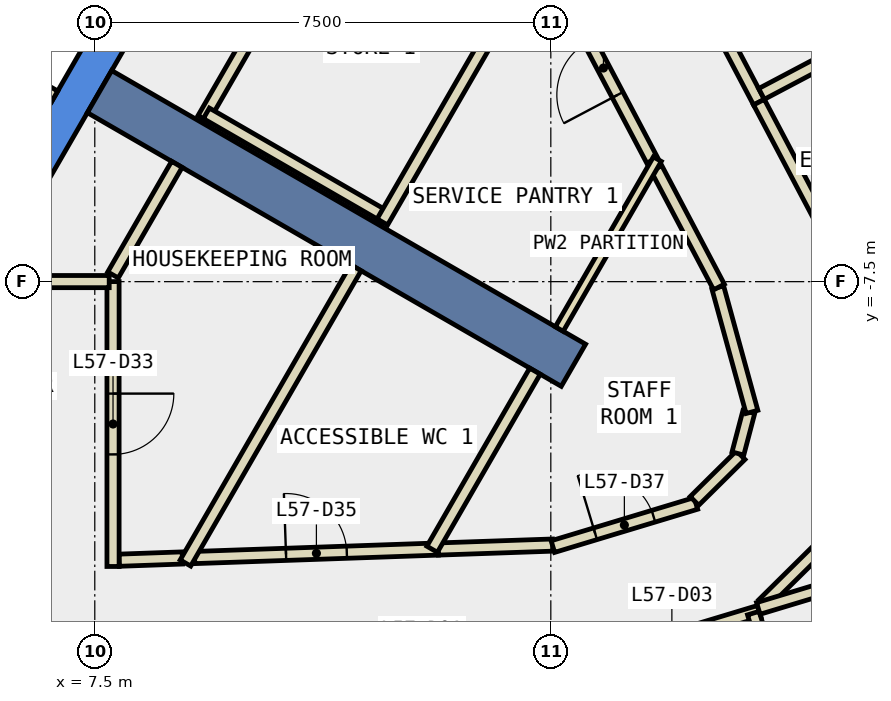
"""IFC4 building model, lengths in metres.
Left out: names, types, materials, properties, quantities, classifications, styles, units other than length and angle.
Written with IfcOpenShell. Run it as: python <this file> out.ifc"""

import sys

from ifc_helpers import new_model, si_unit, direction, frame, frame_2d, origin, place, context, subcontext, project, spatial, polyline, rectangle, outline, extrude, element, fill, save


model = new_model("IFC4")
c1 = context("Model", 3, precision=1e-05, world=origin(), true_north=direction((0.0, 1.0)))
c2 = subcontext(c1, "Body", "Model", "MODEL_VIEW")
j1 = project(units=[si_unit("LENGTHUNIT", "METRE"), si_unit("PLANEANGLEUNIT", "RADIAN")], contexts=[c1])
p1 = place(None, origin())
s1 = spatial("IfcSite", under=j1, at=p1, CompositionType="ELEMENT")
p2 = place(p1, origin())
s2 = spatial("IfcBuilding", under=s1, at=p2, CompositionType="ELEMENT")
p3 = place(p2, frame((0.0, 0.0, 252.2)))
s3 = spatial("IfcBuildingStorey", under=s2, at=p3, CompositionType="ELEMENT", Elevation=252.2)
p4 = place(p3, frame((0.0, 0.0, -0.34)))
e1 = element("IfcWall", 1, at=p4, inside=s3, PredefinedType="SHEAR", context=c2, shape_type="SweptSolid", body=[
    extrude(outline(polyline([(5.774, -7.5), (11.547, 2.5), (10.854, 2.5), (5.427, -6.9), (5.774, -7.5)])), origin(), (0.0, 0.0, 1.0), 3.6),
])
p5 = place(p3, frame((7.578, -4.375, -0.34), z_axis=(0.0, 0.0, 1.0), x_axis=(0.866024315419, -0.5000018851, 0.0)))
e2 = element("IfcWall", 2, at=p5, inside=s3, PredefinedType="SHEAR", context=c2, shape_type="SweptSolid", body=[
    extrude(rectangle(XDim=9.0, YDim=0.8, at=frame_2d((4.5, 0.0))), origin(), (0.0, 0.0, 1.0), 3.6),
])
p6 = place(p3, frame((7.9, -12.081, 0.0), z_axis=(0.0, 0.0, 1.0), x_axis=(0.999365240621, 0.035624652105, 0.0)))
e3 = element("IfcWall", 3, at=p6, inside=s3, PredefinedType="PARTITIONING", context=c2, shape_type="SweptSolid", body=[
    extrude(rectangle(XDim=1.042, YDim=0.2, at=frame_2d((0.521, 0.0))), origin(), (0.0, 0.0, 1.0), 3.26),
])
p7 = place(p3, frame((9.141, -12.037, 0.0), z_axis=(0.0, 0.0, 1.0), x_axis=(0.999388955878, 0.034953038062, 0.0)))
e4 = element("IfcWall", 4, at=p7, inside=s3, PredefinedType="PARTITIONING", context=c2, shape_type="SweptSolid", body=[
    extrude(rectangle(XDim=4.009, YDim=0.2, at=frame_2d((2.005, 0.0))), origin(), (0.0, 0.0, 1.0), 3.26),
])
p8 = place(p7, frame((1.505, 0.0, 0.0)))
e5 = element("IfcOpeningElement", 5, at=p8, cuts=e4, PredefinedType="OPENING", context=c2, shape_type="SweptSolid", body=[
    extrude(rectangle(XDim=1.0, YDim=2.1, at=frame_2d((0.5, 1.05))), frame((0.0, 0.11, 0.0), z_axis=(0.0, -1.0, 0.0), x_axis=(1.0, 0.0, 0.0)), (0.0, 0.0, 1.0), 0.22),
])
p9 = place(p3, frame((16.667, -5.505, 0.0), z_axis=(0.0, 0.0, 1.0), x_axis=(-0.466812680399, 0.884356218624, 0.0)))
e6 = element("IfcWall", 6, at=p9, inside=s3, PredefinedType="PARTITIONING", context=c2, shape_type="SweptSolid", body=[
    extrude(rectangle(XDim=3.434, YDim=0.2, at=frame_2d((1.717, 0.0))), origin(), (0.0, 0.0, 1.0), 3.26),
])
p10 = place(p9, frame((1.217, 0.0, 0.0)))
e7 = element("IfcOpeningElement", 7, at=p10, cuts=e6, PredefinedType="OPENING", context=c2, shape_type="SweptSolid", body=[
    extrude(rectangle(XDim=1.0, YDim=2.1, at=frame_2d((0.5, 1.05))), frame((0.0, 0.11, 0.0), z_axis=(0.0, -1.0, 0.0), x_axis=(1.0, 0.0, 0.0)), (0.0, 0.0, 1.0), 0.22),
])
p11 = place(p3, frame((13.148, -11.897, 0.0), z_axis=(0.0, 0.0, 1.0), x_axis=(0.999405229262, 0.034484601243, 0.0)))
e8 = element("IfcWall", 8, at=p11, inside=s3, PredefinedType="PARTITIONING", context=c2, shape_type="SweptSolid", body=[
    extrude(rectangle(XDim=1.883, YDim=0.2, at=frame_2d((0.942, 0.0))), origin(), (0.0, 0.0, 1.0), 3.26),
])
p12 = place(p3, frame((15.034, -11.857, 0.0), z_axis=(0.0, 0.0, 1.0), x_axis=(0.957338084933, 0.288970225346, 0.0)))
e9 = element("IfcWall", 9, at=p12, inside=s3, PredefinedType="PARTITIONING", context=c2, shape_type="SweptSolid", body=[
    extrude(rectangle(XDim=2.457, YDim=0.2, at=frame_2d((1.229, 0.0))), origin(), (0.0, 0.0, 1.0), 3.26),
])
p13 = place(p12, frame((0.728, 0.0, 0.0)))
e10 = element("IfcOpeningElement", 10, at=p13, cuts=e9, PredefinedType="OPENING", context=c2, shape_type="SweptSolid", body=[
    extrude(rectangle(XDim=1.0, YDim=2.1, at=frame_2d((0.5, 1.05))), frame((0.0, 0.11, 0.0), z_axis=(0.0, -1.0, 0.0), x_axis=(1.0, 0.0, 0.0)), (0.0, 0.0, 1.0), 0.22),
])
p14 = place(p3, frame((17.362, -11.106, 0.0), z_axis=(0.0, 0.0, 1.0), x_axis=(0.710859741153, 0.703333795866, 0.0)))
e11 = element("IfcWall", 11, at=p14, inside=s3, PredefinedType="PARTITIONING", context=c2, shape_type="SweptSolid", body=[
    extrude(rectangle(XDim=1.071, YDim=0.2, at=frame_2d((0.535, 0.0))), origin(), (0.0, 0.0, 1.0), 3.26),
])
p15 = place(p3, frame((18.077, -10.326, 0.0), z_axis=(0.0, 0.0, 1.0), x_axis=(0.254782174857, 0.966998471237, 0.0)))
e12 = element("IfcWall", 12, at=p15, inside=s3, PredefinedType="PARTITIONING", context=c2, shape_type="SweptSolid", body=[
    extrude(rectangle(XDim=0.707, YDim=0.2, at=frame_2d((0.354, 0.0))), origin(), (0.0, 0.0, 1.0), 3.26),
])
p16 = place(p3, frame((18.308, -9.642, 0.0), z_axis=(0.0, 0.0, 1.0), x_axis=(-0.264859637197, 0.96428697626, 0.0)))
e13 = element("IfcWall", 13, at=p16, inside=s3, PredefinedType="PARTITIONING", context=c2, shape_type="SweptSolid", body=[
    extrude(rectangle(XDim=2.122, YDim=0.2, at=frame_2d((1.061, 0.0))), origin(), (0.0, 0.0, 1.0), 3.26),
])
p17 = place(p3, frame((17.766, -7.588, 0.0), z_axis=(0.0, 0.0, 1.0), x_axis=(-0.466727344864, 0.884401258228, 0.0)))
e14 = element("IfcWall", 14, at=p17, inside=s3, PredefinedType="PARTITIONING", context=c2, shape_type="SweptSolid", body=[
    extrude(rectangle(XDim=2.205, YDim=0.2, at=frame_2d((1.103, 0.0))), origin(), (0.0, 0.0, 1.0), 3.26),
])
p18 = place(p3, frame((18.427, -12.922, 0.0), z_axis=(0.0, 0.0, 1.0), x_axis=(-0.957336631432, -0.288975040651, 0.0)))
e15 = element("IfcWall", 15, at=p18, inside=s3, PredefinedType="PARTITIONING", context=c2, shape_type="SweptSolid", body=[
    extrude(rectangle(XDim=3.0, YDim=0.2, at=frame_2d((1.5, 0.0))), origin(), (0.0, 0.0, 1.0), 3.26),
])
p19 = place(p18, frame((1.0, 0.0, 0.0)))
e16 = element("IfcOpeningElement", 16, at=p19, cuts=e15, PredefinedType="OPENING", context=c2, shape_type="SweptSolid", body=[
    extrude(rectangle(XDim=1.0, YDim=2.1, at=frame_2d((0.5, 1.05))), frame((0.0, 0.11, 0.0), z_axis=(0.0, -1.0, 0.0), x_axis=(1.0, 0.0, 0.0)), (0.0, 0.0, 1.0), 0.22),
])
p20 = place(p3, frame((19.919, -11.39, 0.0), z_axis=(0.0, 0.0, 1.0), x_axis=(-0.71104667794, -0.70314480855, 0.0)))
e17 = element("IfcWall", 17, at=p20, inside=s3, PredefinedType="PARTITIONING", context=c2, shape_type="SweptSolid", body=[
    extrude(rectangle(XDim=2.008, YDim=0.2, at=frame_2d((1.004, 0.0))), origin(), (0.0, 0.0, 1.0), 3.26),
])
p21 = place(p3, frame((16.778, -1.429, 0.0), z_axis=(0.0, 0.0, 1.0), x_axis=(0.466493865945, -0.884524433261, 0.0)))
e18 = element("IfcWall", 18, at=p21, inside=s3, PredefinedType="PARTITIONING", context=c2, shape_type="SweptSolid", body=[
    extrude(rectangle(XDim=3.526, YDim=0.2, at=frame_2d((1.763, 0.0))), origin(), (0.0, 0.0, 1.0), 3.26),
])
p22 = place(p21, frame((1.313, 0.0, 0.0)))
e19 = element("IfcOpeningElement", 19, at=p22, cuts=e18, PredefinedType="OPENING", context=c2, shape_type="SweptSolid", body=[
    extrude(rectangle(XDim=1.0, YDim=2.1, at=frame_2d((0.5, 1.05))), frame((0.0, 0.11, 0.0), z_axis=(0.0, -1.0, 0.0), x_axis=(1.0, 0.0, 0.0)), (0.0, 0.0, 1.0), 0.22),
])
p23 = place(p3, frame((18.423, -4.548, 0.0), z_axis=(0.0, 0.0, 1.0), x_axis=(0.466792565793, -0.884366835946, 0.0)))
e20 = element("IfcWall", 20, at=p23, inside=s3, PredefinedType="PARTITIONING", context=c2, shape_type="SweptSolid", body=[
    extrude(rectangle(XDim=2.5, YDim=0.2, at=frame_2d((1.25, 0.0))), origin(), (0.0, 0.0, 1.0), 3.26),
])
p24 = place(p3, frame((5.888, -3.902, 0.0), z_axis=(0.0, 0.0, 1.0), x_axis=(0.86621513555, -0.499671230855, 0.0)))
e21 = element("IfcWall", 21, at=p24, inside=s3, PredefinedType="PARTITIONING", context=c2, shape_type="SweptSolid", body=[
    extrude(rectangle(XDim=1.1, YDim=0.2, at=frame_2d((0.55, 0.0))), origin(), (0.0, 0.0, 1.0), 3.26),
])
p25 = place(p3, frame((7.8, -7.39, 0.0), z_axis=(0.0, 0.0, 1.0), x_axis=(0.499977374825, 0.866038466041, 0.0)))
e22 = element("IfcWall", 22, at=p25, inside=s3, PredefinedType="PARTITIONING", context=c2, shape_type="SweptSolid", body=[
    extrude(rectangle(XDim=2.1, YDim=0.2, at=frame_2d((1.05, 0.0))), origin(), (0.0, 0.0, 1.0), 3.26),
])
p26 = place(p3, frame((9.285, -4.818, 0.0), z_axis=(0.0, 0.0, 1.0), x_axis=(0.499962569651, 0.866047013128, 0.0)))
e23 = element("IfcWall", 23, at=p26, inside=s3, PredefinedType="PARTITIONING", context=c2, shape_type="SweptSolid", body=[
    extrude(rectangle(XDim=7.334, YDim=0.2, at=frame_2d((3.667, 0.0))), origin(), (0.0, 0.0, 1.0), 3.26),
])
p27 = place(p3, frame((7.8, -7.499, 0.0), z_axis=(0.0, 0.0, 1.0), x_axis=(0.0, -1.0, 0.0)))
e24 = element("IfcWall", 24, at=p27, inside=s3, PredefinedType="PARTITIONING", context=c2, shape_type="SweptSolid", body=[
    extrude(rectangle(XDim=4.685, YDim=0.2, at=frame_2d((2.343, 0.0))), origin(), (0.0, 0.0, 1.0), 3.26),
])
p28 = place(p27, frame((1.842, 0.0, 0.0)))
e25 = element("IfcOpeningElement", 25, at=p28, cuts=e24, PredefinedType="OPENING", context=c2, shape_type="SweptSolid", body=[
    extrude(rectangle(XDim=1.0, YDim=2.1, at=frame_2d((0.5, 1.05))), frame((0.0, 0.11, 0.0), z_axis=(0.0, -1.0, 0.0), x_axis=(1.0, 0.0, 0.0)), (0.0, 0.0, 1.0), 0.22),
])
p29 = place(p3, frame((9.335, -4.732, 0.0), z_axis=(0.0, 0.0, 1.0), x_axis=(0.866002606077, -0.500039484709, 0.0)))
e26 = element("IfcWall", 26, at=p29, inside=s3, PredefinedType="PARTITIONING", context=c2, shape_type="SweptSolid", body=[
    extrude(rectangle(XDim=3.4, YDim=0.2, at=frame_2d((1.7, 0.0))), origin(), (0.0, 0.0, 1.0), 3.26),
])
p30 = place(p3, frame((11.794, -7.271, 0.0), z_axis=(0.0, 0.0, 1.0), x_axis=(-0.499918457185, -0.866072477433, 0.0)))
e27 = element("IfcWall", 27, at=p30, inside=s3, PredefinedType="PARTITIONING", context=c2, shape_type="SweptSolid", body=[
    extrude(rectangle(XDim=5.607, YDim=0.2, at=frame_2d((2.803, 0.0))), origin(), (0.0, 0.0, 1.0), 3.26),
])
p31 = place(p3, frame((14.871, -1.942, 0.0), z_axis=(0.0, 0.0, 1.0), x_axis=(-0.50000507839, -0.866022471755, 0.0)))
e28 = element("IfcWall", 28, at=p31, inside=s3, PredefinedType="PARTITIONING", context=c2, shape_type="SweptSolid", body=[
    extrude(rectangle(XDim=5.284, YDim=0.2, at=frame_2d((2.642, 0.0))), origin(), (0.0, 0.0, 1.0), 3.26),
])
p32 = place(p3, frame((14.739, -8.972, 0.0), z_axis=(0.0, 0.0, 1.0), x_axis=(-0.499974489635, -0.8660401317, 0.0)))
e29 = element("IfcWall", 29, at=p32, inside=s3, PredefinedType="PARTITIONING", context=c2, shape_type="SweptSolid", body=[
    extrude(rectangle(XDim=3.382, YDim=0.2, at=frame_2d((1.691, 0.0))), origin(), (0.0, 0.0, 1.0), 3.26),
])
p33 = place(p3, frame((16.752, -5.485, 0.0), z_axis=(0.0, 0.0, 1.0), x_axis=(-0.499988848364, -0.866031842089, 0.0)))
e30 = element("IfcWall", 30, at=p33, inside=s3, PredefinedType="PARTITIONING", context=c2, shape_type="SweptSolid", body=[
    extrude(rectangle(XDim=3.226, YDim=0.15, at=frame_2d((1.613, 0.0))), origin(), (0.0, 0.0, 1.0), 3.26),
])
p34 = place(p3, frame((18.331, -12.951, 0.0), z_axis=(0.0, 0.0, 1.0), x_axis=(0.289175152117, -0.957276204341, 0.0)))
e31 = element("IfcWall", 31, at=p34, inside=s3, PredefinedType="PARTITIONING", context=c2, shape_type="SweptSolid", body=[
    extrude(rectangle(XDim=2.5, YDim=0.2, at=frame_2d((1.25, 0.0))), origin(), (0.0, 0.0, 1.0), 3.26),
])
p35 = place(p3, frame((21.285, -12.007, 0.0), z_axis=(0.0, 0.0, 1.0), x_axis=(-0.957329834998, -0.288997555392, 0.0)))
e32 = element("IfcWall", 32, at=p35, inside=s3, PredefinedType="PARTITIONING", context=c2, shape_type="SweptSolid", body=[
    extrude(rectangle(XDim=3.0, YDim=0.2, at=frame_2d((1.5, 0.0))), origin(), (0.0, 0.0, 1.0), 3.26),
])
p36 = place(p3, frame((20.499, -3.339, 0.0), z_axis=(0.0, 0.0, 1.0), x_axis=(-0.884293452572, -0.466931568583, 0.0)))
e33 = element("IfcWall", 33, at=p36, inside=s3, PredefinedType="PARTITIONING", context=c2, shape_type="SweptSolid", body=[
    extrude(rectangle(XDim=2.3, YDim=0.2, at=frame_2d((1.15, 0.0))), origin(), (0.0, 0.0, 1.0), 3.26),
])
p37 = place(p3, frame((5.944, -7.499, 0.0), z_axis=(0.0, 0.0, 1.0), x_axis=(1.0, 0.0, 0.0)))
e34 = element("IfcWall", 34, at=p37, inside=s3, PredefinedType="PARTITIONING", context=c2, shape_type="SweptSolid", body=[
    extrude(rectangle(XDim=1.793, YDim=0.2, at=frame_2d((0.896, 0.0))), origin(), (0.0, 0.0, 1.0), 3.26),
])
p38 = place(p3, frame((5.492, -3.788, 0.0), z_axis=(0.0, 0.0, 1.0), x_axis=(0.500034260056, 0.866005622828, 0.0)))
e35 = element("IfcWall", 35, at=p38, inside=s3, PredefinedType="STANDARD", context=c2, shape_type="SweptSolid", body=[
    extrude(rectangle(XDim=5.399, YDim=0.2, at=frame_2d((2.7, 0.0))), origin(), (0.0, 0.0, 1.0), 3.26),
])
p39 = place(p28, origin())
e36 = element("IfcDoor", 36, at=p39, inside=s3, OperationType="SINGLE_SWING_LEFT", PredefinedType="DOOR", context=c2, shape_type="SweptSolid", body=[
    extrude(rectangle(XDim=1.0, YDim=2.1, at=frame_2d((0.5, 1.05))), frame((0.0, 0.025, 0.0), z_axis=(0.0, -1.0, 0.0), x_axis=(1.0, 0.0, 0.0)), (0.0, 0.0, 1.0), 0.05),
])
fill(e25, e36)
p40 = place(p8, origin())
e37 = element("IfcDoor", 37, at=p40, inside=s3, OperationType="SINGLE_SWING_LEFT", PredefinedType="DOOR", context=c2, shape_type="SweptSolid", body=[
    extrude(rectangle(XDim=1.0, YDim=2.1, at=frame_2d((0.5, 1.05))), frame((0.0, 0.025, 0.0), z_axis=(0.0, -1.0, 0.0), x_axis=(1.0, 0.0, 0.0)), (0.0, 0.0, 1.0), 0.05),
])
fill(e5, e37)
p41 = place(p10, origin())
e38 = element("IfcDoor", 38, at=p41, inside=s3, OperationType="SINGLE_SWING_RIGHT", PredefinedType="DOOR", context=c2, shape_type="SweptSolid", body=[
    extrude(rectangle(XDim=1.0, YDim=2.1, at=frame_2d((0.5, 1.05))), frame((0.0, 0.025, 0.0), z_axis=(0.0, -1.0, 0.0), x_axis=(1.0, 0.0, 0.0)), (0.0, 0.0, 1.0), 0.05),
])
fill(e7, e38)
p42 = place(p13, origin())
e39 = element("IfcDoor", 39, at=p42, inside=s3, OperationType="SINGLE_SWING_LEFT", PredefinedType="DOOR", context=c2, shape_type="SweptSolid", body=[
    extrude(rectangle(XDim=1.0, YDim=2.1, at=frame_2d((0.5, 1.05))), frame((0.0, 0.025, 0.0), z_axis=(0.0, -1.0, 0.0), x_axis=(1.0, 0.0, 0.0)), (0.0, 0.0, 1.0), 0.05),
])
fill(e10, e39)
save(model, sys.argv[1])
